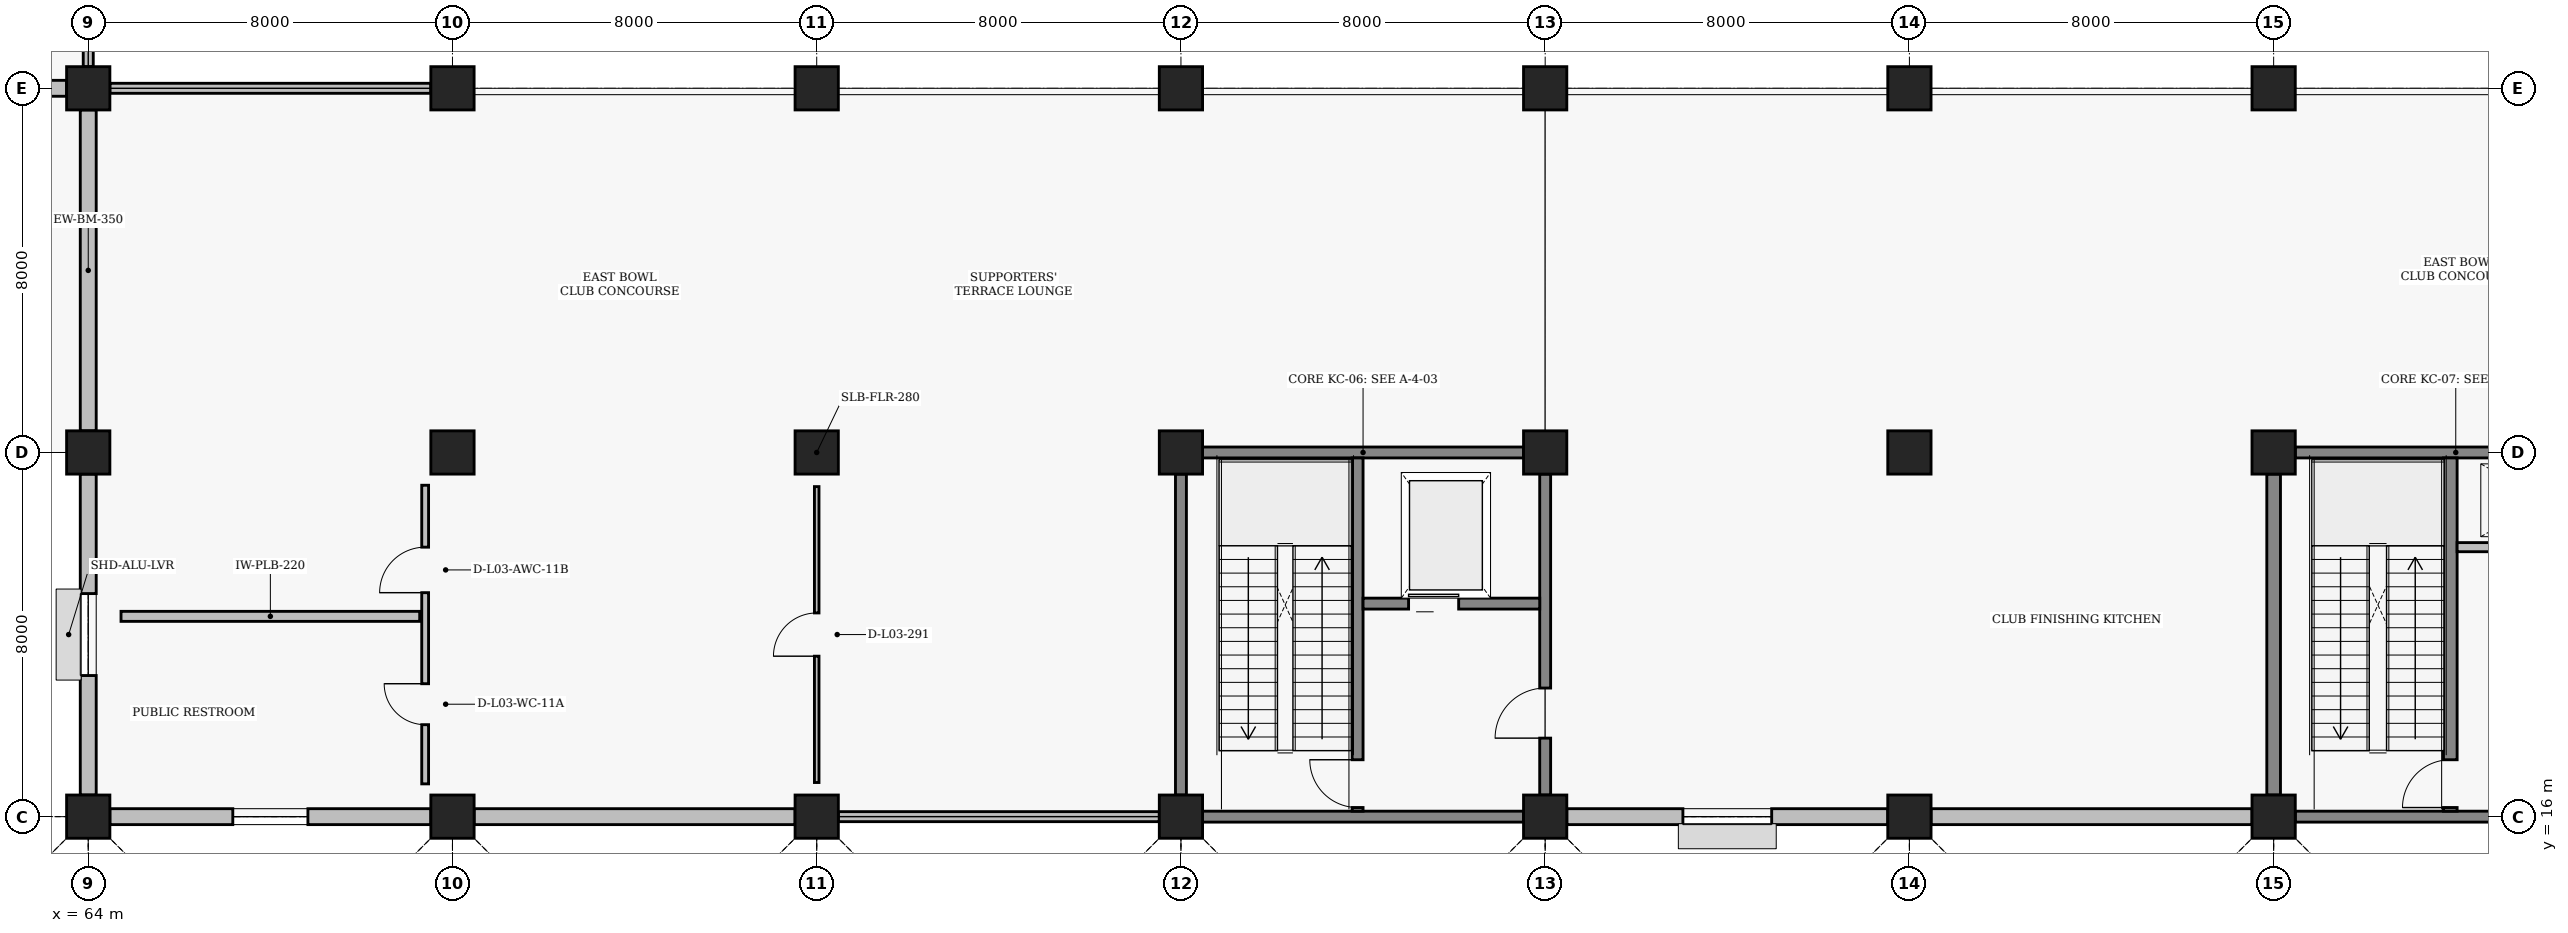
"""IFC4 building model, lengths in metres.
Left out: names, types, materials, properties, quantities, classifications, styles, units other than length and angle.
Written with IfcOpenShell. Run it as: python <this file> out.ifc"""

import sys

from ifc_helpers import new_model, si_unit, direction, frame, frame_2d, origin, origin_2d, place, context, subcontext, project, spatial, rectangle, extrude, element, fill, save


model = new_model("IFC4")
c1 = context("Model", 3, precision=1e-05, world=origin(), true_north=direction((0.0, 1.0)))
c2 = subcontext(c1, "Body", "Model", "MODEL_VIEW")
j1 = project(units=[si_unit("LENGTHUNIT", "METRE"), si_unit("PLANEANGLEUNIT", "RADIAN")], contexts=[c1])
p1 = place(None, origin())
s1 = spatial("IfcSite", under=j1, at=p1, CompositionType="ELEMENT")
p2 = place(p1, origin())
s2 = spatial("IfcBuilding", under=s1, at=p2, CompositionType="ELEMENT")
p3 = place(p2, frame((0.0, 0.0, 9.6)))
s3 = spatial("IfcBuildingStorey", under=s2, at=p3, CompositionType="ELEMENT", Elevation=9.6)
for number, where, z_axis, x_axis in (
    (1, (64.0, 16.0, 0.0), (0.0, 0.0, 1.0), (1.0, 0.0, 0.0)),
    (2, (64.0, 24.0, 0.0), (0.0, 0.0, 1.0), (1.0, 0.0, 0.0)),
    (3, (64.0, 32.0, 0.0), (0.0, 0.0, 1.0), (1.0, 0.0, 0.0)),
    (4, (72.0, 16.0, 0.0), (0.0, 0.0, 1.0), (1.0, 0.0, 0.0)),
    (5, (72.0, 24.0, 0.0), (0.0, 0.0, 1.0), (1.0, 0.0, 0.0)),
    (6, (72.0, 32.0, 0.0), (0.0, 0.0, 1.0), (1.0, 0.0, 0.0)),
    (7, (80.0, 16.0, 0.0), (0.0, 0.0, 1.0), (1.0, 0.0, 0.0)),
    (8, (80.0, 24.0, 0.0), (0.0, 0.0, 1.0), (1.0, 0.0, 0.0)),
    (9, (80.0, 32.0, 0.0), (0.0, 0.0, 1.0), (1.0, 0.0, 0.0)),
    (10, (88.0, 16.0, 0.0), (0.0, 0.0, 1.0), (1.0, 0.0, 0.0)),
    (11, (88.0, 24.0, 0.0), (0.0, 0.0, 1.0), (1.0, 0.0, 0.0)),
    (12, (88.0, 32.0, 0.0), (0.0, 0.0, 1.0), (1.0, 0.0, 0.0)),
    (13, (96.0, 16.0, 0.0), (0.0, 0.0, 1.0), (1.0, 0.0, 0.0)),
    (14, (96.0, 24.0, 0.0), (0.0, 0.0, 1.0), (1.0, 0.0, 0.0)),
    (15, (96.0, 32.0, 0.0), (0.0, 0.0, 1.0), (1.0, 0.0, 0.0)),
    (16, (104.0, 16.0, 0.0), (0.0, 0.0, 1.0), (1.0, 0.0, 0.0)),
    (17, (104.0, 24.0, 0.0), (0.0, 0.0, 1.0), (1.0, 0.0, 0.0)),
    (18, (104.0, 32.0, 0.0), (0.0, 0.0, 1.0), (1.0, 0.0, 0.0)),
    (19, (112.0, 16.0, 0.0), (0.0, 0.0, 1.0), (1.0, 0.0, 0.0)),
    (20, (112.0, 24.0, 0.0), (0.0, 0.0, 1.0), (1.0, 0.0, 0.0)),
    (21, (112.0, 32.0, 0.0), (0.0, 0.0, 1.0), (1.0, 0.0, 0.0)),
):
    element("IfcColumn", number, at=place(p3, frame(where, z_axis=z_axis, x_axis=x_axis)), inside=s3, PredefinedType="COLUMN", context=c2, shape_type="SweptSolid", body=[
        extrude(rectangle(XDim=0.95, YDim=0.95, at=origin_2d()), origin(), (0.0, 0.0, 1.0), 4.8),
    ])
p4 = place(p3, frame((56.475, 32.0, 0.0), z_axis=(0.0, 0.0, 1.0), x_axis=(1.0, 0.0, 0.0)))
e22 = element("IfcWall", 22, at=p4, inside=s3, PredefinedType="SOLIDWALL", context=c2, shape_type="SweptSolid", body=[
    extrude(rectangle(XDim=7.05, YDim=0.35, at=frame_2d((3.525, 0.0))), origin(), (0.0, 0.0, 1.0), 3.93),
])
p5 = place(p3, frame((64.0, 32.475, 0.0), z_axis=(0.0, 0.0, 1.0), x_axis=(0.0, 1.0, 0.0)))
e23 = element("IfcWall", 23, at=p5, inside=s3, PredefinedType="PARAPET", context=c2, shape_type="SweptSolid", body=[
    extrude(rectangle(XDim=7.05, YDim=0.22, at=frame_2d((3.525, 0.0))), origin(), (0.0, 0.0, 1.0), 0.16),
])
p6 = place(p3, frame((64.475, 16.0, 0.0), z_axis=(0.0, 0.0, 1.0), x_axis=(1.0, 0.0, 0.0)))
e24 = element("IfcWall", 24, at=p6, inside=s3, PredefinedType="SOLIDWALL", context=c2, shape_type="SweptSolid", body=[
    extrude(rectangle(XDim=7.05, YDim=0.35, at=frame_2d((3.525, 0.0))), origin(), (0.0, 0.0, 1.0), 3.93),
])
p7 = place(p6, frame((2.7, 0.0, 0.95)))
e25 = element("IfcOpeningElement", 25, at=p7, cuts=e24, PredefinedType="OPENING", context=c2, shape_type="SweptSolid", body=[
    extrude(rectangle(XDim=1.65, YDim=1.7, at=frame_2d((0.825, 0.85))), frame((0.0, 0.185, 0.0), z_axis=(0.0, -1.0, 0.0), x_axis=(1.0, 0.0, 0.0)), (0.0, 0.0, 1.0), 0.37),
])
p8 = place(p3, frame((64.0, 16.475, 0.0), z_axis=(0.0, 0.0, 1.0), x_axis=(0.0, 1.0, 0.0)))
e26 = element("IfcWall", 26, at=p8, inside=s3, PredefinedType="SOLIDWALL", context=c2, shape_type="SweptSolid", body=[
    extrude(rectangle(XDim=7.05, YDim=0.35, at=frame_2d((3.525, 0.0))), origin(), (0.0, 0.0, 1.0), 3.95),
])
p9 = place(p8, frame((2.625, 0.0, 0.95)))
e27 = element("IfcOpeningElement", 27, at=p9, cuts=e26, PredefinedType="OPENING", context=c2, shape_type="SweptSolid", body=[
    extrude(rectangle(XDim=1.8, YDim=1.8, at=frame_2d((0.9, 0.9))), frame((0.0, 0.185, 0.0), z_axis=(0.0, -1.0, 0.0), x_axis=(1.0, 0.0, 0.0)), (0.0, 0.0, 1.0), 0.37),
])
p10 = place(p3, frame((64.475, 32.0, 0.0), z_axis=(0.0, 0.0, 1.0), x_axis=(1.0, 0.0, 0.0)))
e28 = element("IfcWall", 28, at=p10, inside=s3, PredefinedType="PARAPET", context=c2, shape_type="SweptSolid", body=[
    extrude(rectangle(XDim=7.05, YDim=0.22, at=frame_2d((3.525, 0.0))), origin(), (0.0, 0.0, 1.0), 0.16),
])
for number, where, z_axis, x_axis in (
    (29, (64.0, 24.475, 0.0), (0.0, 0.0, 1.0), (0.0, 1.0, 0.0)),
    (30, (72.475, 16.0, 0.0), (0.0, 0.0, 1.0), (1.0, 0.0, 0.0)),
):
    element("IfcWall", number, at=place(p3, frame(where, z_axis=z_axis, x_axis=x_axis)), inside=s3, PredefinedType="SOLIDWALL", context=c2, shape_type="SweptSolid", body=[
        extrude(rectangle(XDim=7.05, YDim=0.35, at=frame_2d((3.525, 0.0))), origin(), (0.0, 0.0, 1.0), 3.93),
    ])
p11 = place(p3, frame((80.475, 16.0, 0.0), z_axis=(0.0, 0.0, 1.0), x_axis=(1.0, 0.0, 0.0)))
e31 = element("IfcWall", 31, at=p11, inside=s3, PredefinedType="PARAPET", context=c2, shape_type="SweptSolid", body=[
    extrude(rectangle(XDim=7.05, YDim=0.22, at=frame_2d((3.525, 0.0))), origin(), (0.0, 0.0, 1.0), 0.16),
])
p12 = place(p3, frame((96.475, 16.0, 0.0), z_axis=(0.0, 0.0, 1.0), x_axis=(1.0, 0.0, 0.0)))
e32 = element("IfcWall", 32, at=p12, inside=s3, PredefinedType="SOLIDWALL", context=c2, shape_type="SweptSolid", body=[
    extrude(rectangle(XDim=7.05, YDim=0.35, at=frame_2d((3.525, 0.0))), origin(), (0.0, 0.0, 1.0), 3.93),
])
p13 = place(p12, frame((2.55, 0.0, 0.95)))
e33 = element("IfcOpeningElement", 33, at=p13, cuts=e32, PredefinedType="OPENING", context=c2, shape_type="SweptSolid", body=[
    extrude(rectangle(XDim=1.95, YDim=1.8, at=frame_2d((0.975, 0.9))), frame((0.0, 0.185, 0.0), z_axis=(0.0, -1.0, 0.0), x_axis=(1.0, 0.0, 0.0)), (0.0, 0.0, 1.0), 0.37),
])
p14 = place(p3, frame((104.475, 16.0, 0.0), z_axis=(0.0, 0.0, 1.0), x_axis=(1.0, 0.0, 0.0)))
e34 = element("IfcWall", 34, at=p14, inside=s3, PredefinedType="SOLIDWALL", context=c2, shape_type="SweptSolid", body=[
    extrude(rectangle(XDim=7.05, YDim=0.35, at=frame_2d((3.525, 0.0))), origin(), (0.0, 0.0, 1.0), 3.93),
])
for number, where, z_axis, x_axis in (
    (35, (88.475, 16.0, 0.0), (0.0, 0.0, 1.0), (1.0, 0.0, 0.0)),
    (36, (88.475, 24.0, 0.0), (0.0, 0.0, 1.0), (1.0, 0.0, 0.0)),
    (37, (88.0, 16.475, 0.0), (0.0, 0.0, 1.0), (0.0, 1.0, 0.0)),
):
    element("IfcWall", number, at=place(p3, frame(where, z_axis=z_axis, x_axis=x_axis)), inside=s3, PredefinedType="SHEAR", context=c2, shape_type="SweptSolid", body=[
        extrude(rectangle(XDim=7.05, YDim=0.24, at=frame_2d((3.525, 0.0))), origin(), (0.0, 0.0, 1.0), 3.93),
    ])
p15 = place(p3, frame((96.0, 16.475, 0.0), z_axis=(0.0, 0.0, 1.0), x_axis=(0.0, 1.0, 0.0)))
e38 = element("IfcWall", 38, at=p15, inside=s3, PredefinedType="SHEAR", context=c2, shape_type="SweptSolid", body=[
    extrude(rectangle(XDim=7.05, YDim=0.24, at=frame_2d((3.525, 0.0))), origin(), (0.0, 0.0, 1.0), 3.93),
])
p16 = place(p15, frame((1.25, 0.0, 0.0)))
e39 = element("IfcOpeningElement", 39, at=p16, cuts=e38, PredefinedType="OPENING", context=c2, shape_type="SweptSolid", body=[
    extrude(rectangle(XDim=1.1, YDim=2.2, at=frame_2d((0.55, 1.1))), frame((0.0, 0.13, 0.0), z_axis=(0.0, -1.0, 0.0), x_axis=(1.0, 0.0, 0.0)), (0.0, 0.0, 1.0), 0.26),
])
p17 = place(p3, frame((91.88, 16.12, 0.0), z_axis=(0.0, 0.0, 1.0), x_axis=(0.0, 1.0, 0.0)))
e40 = element("IfcWall", 40, at=p17, inside=s3, PredefinedType="SHEAR", context=c2, shape_type="SweptSolid", body=[
    extrude(rectangle(XDim=7.76, YDim=0.24, at=frame_2d((3.88, 0.0))), origin(), (0.0, 0.0, 1.0), 4.03),
])
p18 = place(p17, frame((0.08, 0.0, 0.0)))
e41 = element("IfcOpeningElement", 41, at=p18, cuts=e40, PredefinedType="OPENING", context=c2, shape_type="SweptSolid", body=[
    extrude(rectangle(XDim=1.05, YDim=2.15, at=frame_2d((0.525, 1.075))), frame((0.0, 0.13, 0.0), z_axis=(0.0, -1.0, 0.0), x_axis=(1.0, 0.0, 0.0)), (0.0, 0.0, 1.0), 0.26),
])
p19 = place(p3, frame((92.0, 20.68, 0.0), z_axis=(0.0, 0.0, 1.0), x_axis=(1.0, 0.0, 0.0)))
e42 = element("IfcWall", 42, at=p19, inside=s3, PredefinedType="SHEAR", context=c2, shape_type="SweptSolid", body=[
    extrude(rectangle(XDim=3.88, YDim=0.24, at=frame_2d((1.94, 0.0))), origin(), (0.0, 0.0, 1.0), 3.93),
])
p20 = place(p19, frame((1.0, 0.0, 0.0)))
e43 = element("IfcOpeningElement", 43, at=p20, cuts=e42, PredefinedType="OPENING", context=c2, shape_type="SweptSolid", body=[
    extrude(rectangle(XDim=1.1, YDim=2.15, at=frame_2d((0.55, 1.075))), frame((0.0, 0.13, 0.0), z_axis=(0.0, -1.0, 0.0), x_axis=(1.0, 0.0, 0.0)), (0.0, 0.0, 1.0), 0.26),
])
p21 = place(p3, frame((112.475, 16.0, 0.0), z_axis=(0.0, 0.0, 1.0), x_axis=(1.0, 0.0, 0.0)))
e44 = element("IfcWall", 44, at=p21, inside=s3, PredefinedType="SHEAR", context=c2, shape_type="SweptSolid", body=[
    extrude(rectangle(XDim=7.05, YDim=0.24, at=frame_2d((3.525, 0.0))), origin(), (0.0, 0.0, 1.0), 3.93),
])
p22 = place(p3, frame((112.475, 24.0, 0.0), z_axis=(0.0, 0.0, 1.0), x_axis=(1.0, 0.0, 0.0)))
e45 = element("IfcWall", 45, at=p22, inside=s3, PredefinedType="SHEAR", context=c2, shape_type="SweptSolid", body=[
    extrude(rectangle(XDim=7.05, YDim=0.24, at=frame_2d((3.525, 0.0))), origin(), (0.0, 0.0, 1.0), 3.68),
])
p23 = place(p3, frame((112.0, 16.475, 0.0), z_axis=(0.0, 0.0, 1.0), x_axis=(0.0, 1.0, 0.0)))
e46 = element("IfcWall", 46, at=p23, inside=s3, PredefinedType="SHEAR", context=c2, shape_type="SweptSolid", body=[
    extrude(rectangle(XDim=7.05, YDim=0.3, at=frame_2d((3.525, 0.0))), origin(), (0.0, 0.0, 1.0), 3.68),
])
p24 = place(p3, frame((115.88, 16.12, 0.0), z_axis=(0.0, 0.0, 1.0), x_axis=(0.0, 1.0, 0.0)))
e47 = element("IfcWall", 47, at=p24, inside=s3, PredefinedType="SHEAR", context=c2, shape_type="SweptSolid", body=[
    extrude(rectangle(XDim=7.76, YDim=0.3, at=frame_2d((3.88, 0.0))), origin(), (0.0, 0.0, 1.0), 4.03),
])
p25 = place(p24, frame((0.08, 0.0, 0.0)))
e48 = element("IfcOpeningElement", 48, at=p25, cuts=e47, PredefinedType="OPENING", context=c2, shape_type="SweptSolid", body=[
    extrude(rectangle(XDim=1.05, YDim=2.15, at=frame_2d((0.525, 1.075))), frame((0.0, 0.16, 0.0), z_axis=(0.0, -1.0, 0.0), x_axis=(1.0, 0.0, 0.0)), (0.0, 0.0, 1.0), 0.32),
])
p26 = place(p3, frame((116.03, 21.92, 0.0), z_axis=(0.0, 0.0, 1.0), x_axis=(1.0, 0.0, 0.0)))
e49 = element("IfcWall", 49, at=p26, inside=s3, PredefinedType="PARTITIONING", context=c2, shape_type="SweptSolid", body=[
    extrude(rectangle(XDim=3.82, YDim=0.2, at=frame_2d((1.91, 0.0))), origin(), (0.0, 0.0, 1.0), 3.93),
])
p27 = place(p26, frame((1.25, 0.0, 0.0)))
e50 = element("IfcOpeningElement", 50, at=p27, cuts=e49, PredefinedType="OPENING", context=c2, shape_type="SweptSolid", body=[
    extrude(rectangle(XDim=0.85, YDim=2.05, at=frame_2d((0.425, 1.025))), frame((0.0, 0.11, 0.0), z_axis=(0.0, -1.0, 0.0), x_axis=(1.0, 0.0, 0.0)), (0.0, 0.0, 1.0), 0.22),
])
p28 = place(p3, frame((64.72, 20.4, 0.0), z_axis=(0.0, 0.0, 1.0), x_axis=(1.0, 0.0, 0.0)))
e51 = element("IfcWall", 51, at=p28, inside=s3, PredefinedType="PLUMBINGWALL", context=c2, shape_type="SweptSolid", body=[
    extrude(rectangle(XDim=6.56, YDim=0.22, at=frame_2d((3.28, 0.0))), origin(), (0.0, 0.0, 1.0), 4.22),
])
p29 = place(p3, frame((71.4, 16.72, 0.0), z_axis=(0.0, 0.0, 1.0), x_axis=(0.0, 1.0, 0.0)))
e52 = element("IfcWall", 52, at=p29, inside=s3, PredefinedType="PARTITIONING", context=c2, shape_type="SweptSolid", body=[
    extrude(rectangle(XDim=6.56, YDim=0.15, at=frame_2d((3.28, 0.0))), origin(), (0.0, 0.0, 1.0), 4.22),
])
p30 = place(p29, frame((1.3, 0.0, 0.0)))
e53 = element("IfcOpeningElement", 53, at=p30, cuts=e52, PredefinedType="OPENING", context=c2, shape_type="SweptSolid", body=[
    extrude(rectangle(XDim=0.9, YDim=2.1, at=frame_2d((0.45, 1.05))), frame((0.0, 0.085, 0.0), z_axis=(0.0, -1.0, 0.0), x_axis=(1.0, 0.0, 0.0)), (0.0, 0.0, 1.0), 0.17),
])
p31 = place(p29, frame((4.2, 0.0, 0.0)))
e54 = element("IfcOpeningElement", 54, at=p31, cuts=e52, PredefinedType="OPENING", context=c2, shape_type="SweptSolid", body=[
    extrude(rectangle(XDim=1.0, YDim=2.15, at=frame_2d((0.5, 1.075))), frame((0.0, 0.085, 0.0), z_axis=(0.0, -1.0, 0.0), x_axis=(1.0, 0.0, 0.0)), (0.0, 0.0, 1.0), 0.17),
])
p32 = place(p3, frame((80.0, 16.75, 0.0), z_axis=(0.0, 0.0, 1.0), x_axis=(0.0, 1.0, 0.0)))
e55 = element("IfcWall", 55, at=p32, inside=s3, PredefinedType="PARTITIONING", context=c2, shape_type="SweptSolid", body=[
    extrude(rectangle(XDim=6.5, YDim=0.1, at=frame_2d((3.25, 0.0))), origin(), (0.0, 0.0, 1.0), 3.93),
])
p33 = place(p32, frame((2.775, 0.0, 0.0)))
e56 = element("IfcOpeningElement", 56, at=p33, cuts=e55, PredefinedType="OPENING", context=c2, shape_type="SweptSolid", body=[
    extrude(rectangle(XDim=0.95, YDim=2.1, at=frame_2d((0.475, 1.05))), frame((0.0, 0.06, 0.0), z_axis=(0.0, -1.0, 0.0), x_axis=(1.0, 0.0, 0.0)), (0.0, 0.0, 1.0), 0.12),
])
p34 = place(p7, origin())
e57 = element("IfcWindow", 57, at=p34, inside=s3, PartitioningType="SINGLE_PANEL", PredefinedType="WINDOW", context=c2, shape_type="SweptSolid", body=[
    extrude(rectangle(XDim=1.65, YDim=1.7, at=frame_2d((0.825, 0.85))), frame((0.0, 0.03, 0.0), z_axis=(0.0, -1.0, 0.0), x_axis=(1.0, 0.0, 0.0)), (0.0, 0.0, 1.0), 0.06),
])
fill(e25, e57)
p35 = place(p9, origin())
e58 = element("IfcWindow", 58, at=p35, inside=s3, PartitioningType="SINGLE_PANEL", PredefinedType="WINDOW", context=c2, shape_type="SweptSolid", body=[
    extrude(rectangle(XDim=1.8, YDim=1.8, at=frame_2d((0.9, 0.9))), frame((0.0, 0.03, 0.0), z_axis=(0.0, -1.0, 0.0), x_axis=(1.0, 0.0, 0.0)), (0.0, 0.0, 1.0), 0.06),
])
fill(e27, e58)
p36 = place(p13, origin())
e59 = element("IfcWindow", 59, at=p36, inside=s3, PartitioningType="SINGLE_PANEL", PredefinedType="WINDOW", context=c2, shape_type="SweptSolid", body=[
    extrude(rectangle(XDim=1.95, YDim=1.8, at=frame_2d((0.975, 0.9))), frame((0.0, 0.03, 0.0), z_axis=(0.0, -1.0, 0.0), x_axis=(1.0, 0.0, 0.0)), (0.0, 0.0, 1.0), 0.06),
])
fill(e33, e59)
p37 = place(p16, origin())
e60 = element("IfcDoor", 60, at=p37, inside=s3, OperationType="SINGLE_SWING_LEFT", PredefinedType="DOOR", context=c2, shape_type="SweptSolid", body=[
    extrude(rectangle(XDim=1.1, YDim=2.2, at=frame_2d((0.55, 1.1))), frame((0.0, 0.025, 0.0), z_axis=(0.0, -1.0, 0.0), x_axis=(1.0, 0.0, 0.0)), (0.0, 0.0, 1.0), 0.05),
])
fill(e39, e60)
p38 = place(p18, origin())
e61 = element("IfcDoor", 61, at=p38, inside=s3, OperationType="SINGLE_SWING_RIGHT", PredefinedType="DOOR", context=c2, shape_type="SweptSolid", body=[
    extrude(rectangle(XDim=1.05, YDim=2.15, at=frame_2d((0.525, 1.075))), frame((0.0, 0.025, 0.0), z_axis=(0.0, -1.0, 0.0), x_axis=(1.0, 0.0, 0.0)), (0.0, 0.0, 1.0), 0.05),
])
fill(e41, e61)
p39 = place(p20, origin())
e62 = element("IfcDoor", 62, at=p39, inside=s3, OperationType="SLIDING_TO_LEFT", PredefinedType="DOOR", context=c2, shape_type="SweptSolid", body=[
    extrude(rectangle(XDim=1.1, YDim=2.15, at=frame_2d((0.55, 1.075))), frame((0.0, 0.025, 0.0), z_axis=(0.0, -1.0, 0.0), x_axis=(1.0, 0.0, 0.0)), (0.0, 0.0, 1.0), 0.05),
])
fill(e43, e62)
p40 = place(p25, origin())
e63 = element("IfcDoor", 63, at=p40, inside=s3, OperationType="SINGLE_SWING_LEFT", PredefinedType="DOOR", context=c2, shape_type="SweptSolid", body=[
    extrude(rectangle(XDim=1.05, YDim=2.15, at=frame_2d((0.525, 1.075))), frame((0.0, 0.025, 0.0), z_axis=(0.0, -1.0, 0.0), x_axis=(1.0, 0.0, 0.0)), (0.0, 0.0, 1.0), 0.05),
])
fill(e48, e63)
p41 = place(p30, origin())
e64 = element("IfcDoor", 64, at=p41, inside=s3, OperationType="SINGLE_SWING_RIGHT", PredefinedType="DOOR", context=c2, shape_type="SweptSolid", body=[
    extrude(rectangle(XDim=0.9, YDim=2.1, at=frame_2d((0.45, 1.05))), frame((0.0, 0.025, 0.0), z_axis=(0.0, -1.0, 0.0), x_axis=(1.0, 0.0, 0.0)), (0.0, 0.0, 1.0), 0.05),
])
fill(e53, e64)
p42 = place(p31, origin())
e65 = element("IfcDoor", 65, at=p42, inside=s3, OperationType="SINGLE_SWING_LEFT", PredefinedType="DOOR", context=c2, shape_type="SweptSolid", body=[
    extrude(rectangle(XDim=1.0, YDim=2.15, at=frame_2d((0.5, 1.075))), frame((0.0, 0.025, 0.0), z_axis=(0.0, -1.0, 0.0), x_axis=(1.0, 0.0, 0.0)), (0.0, 0.0, 1.0), 0.05),
])
fill(e54, e65)
p43 = place(p33, origin())
e66 = element("IfcDoor", 66, at=p43, inside=s3, OperationType="SINGLE_SWING_LEFT", PredefinedType="DOOR", context=c2, shape_type="SweptSolid", body=[
    extrude(rectangle(XDim=0.95, YDim=2.1, at=frame_2d((0.475, 1.05))), frame((0.0, 0.025, 0.0), z_axis=(0.0, -1.0, 0.0), x_axis=(1.0, 0.0, 0.0)), (0.0, 0.0, 1.0), 0.05),
])
fill(e56, e66)
save(model, sys.argv[1])
